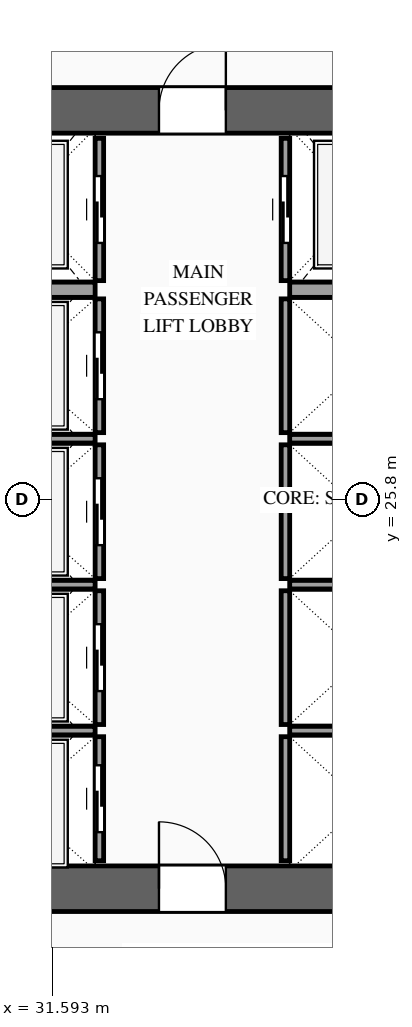
"""IFC4 building model, lengths in metres.
Left out: names, types, materials, properties, quantities, classifications, styles, units other than length and angle.
Written with IfcOpenShell. Run it as: python <this file> out.ifc"""

import sys

from ifc_helpers import new_model, si_unit, direction, frame, frame_2d, origin, place, context, subcontext, project, spatial, rectangle, extrude, source, transform, mapped, element, fill, save


model = new_model("IFC4")
c1 = context("Model", 3, precision=1e-05, world=origin(), true_north=direction((0.0, 1.0)))
c2 = subcontext(c1, "Body", "Model", "MODEL_VIEW")
j1 = project(units=[si_unit("LENGTHUNIT", "METRE"), si_unit("PLANEANGLEUNIT", "RADIAN")], contexts=[c1])
p1 = place(None, origin())
s1 = spatial("IfcSite", under=j1, at=p1, CompositionType="ELEMENT")
p2 = place(p1, origin())
s2 = spatial("IfcBuilding", under=s1, at=p2, CompositionType="ELEMENT")
p3 = place(p2, frame((0.0, 0.0, 101.0)))
s3 = spatial("IfcBuildingStorey", under=s2, at=p3, CompositionType="ELEMENT", Elevation=101.0)
p4 = place(p3, frame((23.425, 19.4, 0.0), z_axis=(0.0, 0.0, 1.0), x_axis=(1.0, 0.0, 0.0)))
e1 = element("IfcWall", 1, at=p4, inside=s3, PredefinedType="SHEAR", context=c2, shape_type="SweptSolid", body=[
    extrude(rectangle(XDim=27.15, YDim=0.75, at=frame_2d((13.575, 0.0))), origin(), (0.0, 0.0, 1.0), 3.6),
])
p5 = place(p4, frame((2.025, 0.0, 0.0)))
e2 = element("IfcOpeningElement", 2, at=p5, cuts=e1, PredefinedType="OPENING", context=c2, shape_type="SweptSolid", body=[
    extrude(rectangle(XDim=1.1, YDim=2.2, at=frame_2d((0.55, 1.1))), frame((0.0, 0.39, 0.0), z_axis=(0.0, -1.0, 0.0), x_axis=(1.0, 0.0, 0.0)), (0.0, 0.0, 1.0), 0.78),
])
p6 = place(p4, frame((9.925, 0.0, 0.0)))
e3 = element("IfcOpeningElement", 3, at=p6, cuts=e1, PredefinedType="OPENING", context=c2, shape_type="SweptSolid", body=[
    extrude(rectangle(XDim=1.1, YDim=2.2, at=frame_2d((0.55, 1.1))), frame((0.0, 0.39, 0.0), z_axis=(0.0, -1.0, 0.0), x_axis=(1.0, 0.0, 0.0)), (0.0, 0.0, 1.0), 0.78),
])
p7 = place(p4, frame((23.125, 0.0, 0.0)))
e4 = element("IfcOpeningElement", 4, at=p7, cuts=e1, PredefinedType="OPENING", context=c2, shape_type="SweptSolid", body=[
    extrude(rectangle(XDim=1.1, YDim=2.2, at=frame_2d((0.55, 1.1))), frame((0.0, 0.39, 0.0), z_axis=(0.0, -1.0, 0.0), x_axis=(1.0, 0.0, 0.0)), (0.0, 0.0, 1.0), 0.78),
])
p8 = place(p4, frame((19.745, 0.0, 0.0)))
e5 = element("IfcOpeningElement", 5, at=p8, cuts=e1, PredefinedType="OPENING", context=c2, shape_type="SweptSolid", body=[
    extrude(rectangle(XDim=0.9, YDim=2.15, at=frame_2d((0.45, 1.075))), frame((0.0, 0.39, 0.0), z_axis=(0.0, -1.0, 0.0), x_axis=(1.0, 0.0, 0.0)), (0.0, 0.0, 1.0), 0.78),
])
p9 = place(p4, frame((18.305, 0.0, 0.0)))
e6 = element("IfcOpeningElement", 6, at=p9, cuts=e1, PredefinedType="OPENING", context=c2, shape_type="SweptSolid", body=[
    extrude(rectangle(XDim=0.9, YDim=2.15, at=frame_2d((0.45, 1.075))), frame((0.0, 0.39, 0.0), z_axis=(0.0, -1.0, 0.0), x_axis=(1.0, 0.0, 0.0)), (0.0, 0.0, 1.0), 0.78),
])
p10 = place(p3, frame((23.425, 32.2, 0.0), z_axis=(0.0, 0.0, 1.0), x_axis=(1.0, 0.0, 0.0)))
e7 = element("IfcWall", 7, at=p10, inside=s3, PredefinedType="SHEAR", context=c2, shape_type="SweptSolid", body=[
    extrude(rectangle(XDim=27.15, YDim=0.75, at=frame_2d((13.575, 0.0))), origin(), (0.0, 0.0, 1.0), 3.6),
])
p11 = place(p10, frame((4.645, 0.0, 0.0)))
e8 = element("IfcOpeningElement", 8, at=p11, cuts=e7, PredefinedType="OPENING", context=c2, shape_type="SweptSolid", body=[
    extrude(rectangle(XDim=0.9, YDim=2.15, at=frame_2d((0.45, 1.075))), frame((0.0, 0.39, 0.0), z_axis=(0.0, -1.0, 0.0), x_axis=(1.0, 0.0, 0.0)), (0.0, 0.0, 1.0), 0.78),
])
p12 = place(p10, frame((9.925, 0.0, 0.0)))
e9 = element("IfcOpeningElement", 9, at=p12, cuts=e7, PredefinedType="OPENING", context=c2, shape_type="SweptSolid", body=[
    extrude(rectangle(XDim=1.1, YDim=2.2, at=frame_2d((0.55, 1.1))), frame((0.0, 0.39, 0.0), z_axis=(0.0, -1.0, 0.0), x_axis=(1.0, 0.0, 0.0)), (0.0, 0.0, 1.0), 0.78),
])
p13 = place(p10, frame((15.775, 0.0, 0.0)))
e10 = element("IfcOpeningElement", 10, at=p13, cuts=e7, PredefinedType="OPENING", context=c2, shape_type="SweptSolid", body=[
    extrude(rectangle(XDim=1.1, YDim=2.2, at=frame_2d((0.55, 1.1))), frame((0.0, 0.39, 0.0), z_axis=(0.0, -1.0, 0.0), x_axis=(1.0, 0.0, 0.0)), (0.0, 0.0, 1.0), 0.78),
])
p14 = place(p10, frame((19.745, 0.0, 0.0)))
e11 = element("IfcOpeningElement", 11, at=p14, cuts=e7, PredefinedType="OPENING", context=c2, shape_type="SweptSolid", body=[
    extrude(rectangle(XDim=0.9, YDim=2.15, at=frame_2d((0.45, 1.075))), frame((0.0, 0.39, 0.0), z_axis=(0.0, -1.0, 0.0), x_axis=(1.0, 0.0, 0.0)), (0.0, 0.0, 1.0), 0.78),
])
p15 = place(p3, frame((32.37, 19.86, 0.0), z_axis=(0.0, 0.0, 1.0), x_axis=(0.0, 1.0, 0.0)))
e12 = element("IfcWall", 12, at=p15, inside=s3, PredefinedType="SOLIDWALL", context=c2, shape_type="SweptSolid", body=[
    extrude(rectangle(XDim=2.04, YDim=0.14, at=frame_2d((1.02, 0.0))), origin(), (0.0, 0.0, 1.0), 3.38),
])
p16 = place(p15, frame((0.47, 0.0, 0.0)))
e13 = element("IfcOpeningElement", 13, at=p16, cuts=e12, PredefinedType="OPENING", context=c2, shape_type="SweptSolid", body=[
    extrude(rectangle(XDim=1.1, YDim=2.2, at=frame_2d((0.55, 1.1))), frame((0.0, 0.085, 0.0), z_axis=(0.0, -1.0, 0.0), x_axis=(1.0, 0.0, 0.0)), (0.0, 0.0, 1.0), 0.17),
])
m1 = source(origin(), c2, "Body", "SweptSolid", [
    extrude(rectangle(XDim=2.5, YDim=0.14, at=frame_2d((1.25, 0.0))), origin(), (0.0, 0.0, 1.0), 3.38),
])
p17 = place(p3, frame((29.8, 22.0, 0.0), z_axis=(0.0, 0.0, 1.0), x_axis=(1.0, 0.0, 0.0)))
e14 = element("IfcWall", 14, at=p17, inside=s3, PredefinedType="SOLIDWALL", context=c2, shape_type="MappedRepresentation", body=[
    mapped(m1, transform((0.0, 0.0, 0.0), scale=1.0)),
])
p18 = place(p3, frame((32.37, 22.1, 0.0), z_axis=(0.0, 0.0, 1.0), x_axis=(0.0, 1.0, 0.0)))
e15 = element("IfcWall", 15, at=p18, inside=s3, PredefinedType="SOLIDWALL", context=c2, shape_type="SweptSolid", body=[
    extrude(rectangle(XDim=2.2, YDim=0.14, at=frame_2d((1.1, 0.0))), origin(), (0.0, 0.0, 1.0), 3.38),
])
p19 = place(p18, frame((0.55, 0.0, 0.0)))
e16 = element("IfcOpeningElement", 16, at=p19, cuts=e15, PredefinedType="OPENING", context=c2, shape_type="SweptSolid", body=[
    extrude(rectangle(XDim=1.1, YDim=2.2, at=frame_2d((0.55, 1.1))), frame((0.0, 0.085, 0.0), z_axis=(0.0, -1.0, 0.0), x_axis=(1.0, 0.0, 0.0)), (0.0, 0.0, 1.0), 0.17),
])
p20 = place(p3, frame((29.8, 24.4, 0.0), z_axis=(0.0, 0.0, 1.0), x_axis=(1.0, 0.0, 0.0)))
e17 = element("IfcWall", 17, at=p20, inside=s3, PredefinedType="SOLIDWALL", context=c2, shape_type="MappedRepresentation", body=[
    mapped(m1, transform((0.0, 0.0, 0.0), scale=1.0)),
])
p21 = place(p3, frame((32.37, 24.5, 0.0), z_axis=(0.0, 0.0, 1.0), x_axis=(0.0, 1.0, 0.0)))
e18 = element("IfcWall", 18, at=p21, inside=s3, PredefinedType="SOLIDWALL", context=c2, shape_type="SweptSolid", body=[
    extrude(rectangle(XDim=2.2, YDim=0.14, at=frame_2d((1.1, 0.0))), origin(), (0.0, 0.0, 1.0), 3.38),
])
p22 = place(p21, frame((0.55, 0.0, 0.0)))
e19 = element("IfcOpeningElement", 19, at=p22, cuts=e18, PredefinedType="OPENING", context=c2, shape_type="SweptSolid", body=[
    extrude(rectangle(XDim=1.1, YDim=2.2, at=frame_2d((0.55, 1.1))), frame((0.0, 0.085, 0.0), z_axis=(0.0, -1.0, 0.0), x_axis=(1.0, 0.0, 0.0)), (0.0, 0.0, 1.0), 0.17),
])
p23 = place(p3, frame((29.8, 26.8, 0.0), z_axis=(0.0, 0.0, 1.0), x_axis=(1.0, 0.0, 0.0)))
e20 = element("IfcWall", 20, at=p23, inside=s3, PredefinedType="SOLIDWALL", context=c2, shape_type="MappedRepresentation", body=[
    mapped(m1, transform((0.0, 0.0, 0.0), scale=1.0)),
])
p24 = place(p3, frame((32.37, 26.9, 0.0), z_axis=(0.0, 0.0, 1.0), x_axis=(0.0, 1.0, 0.0)))
e21 = element("IfcWall", 21, at=p24, inside=s3, PredefinedType="SOLIDWALL", context=c2, shape_type="SweptSolid", body=[
    extrude(rectangle(XDim=2.2, YDim=0.14, at=frame_2d((1.1, 0.0))), origin(), (0.0, 0.0, 1.0), 3.38),
])
p25 = place(p24, frame((0.55, 0.0, 0.0)))
e22 = element("IfcOpeningElement", 22, at=p25, cuts=e21, PredefinedType="OPENING", context=c2, shape_type="SweptSolid", body=[
    extrude(rectangle(XDim=1.1, YDim=2.2, at=frame_2d((0.55, 1.1))), frame((0.0, 0.085, 0.0), z_axis=(0.0, -1.0, 0.0), x_axis=(1.0, 0.0, 0.0)), (0.0, 0.0, 1.0), 0.17),
])
p26 = place(p3, frame((32.37, 29.4, 0.0), z_axis=(0.0, 0.0, 1.0), x_axis=(0.0, 1.0, 0.0)))
e23 = element("IfcWall", 23, at=p26, inside=s3, PredefinedType="SOLIDWALL", context=c2, shape_type="SweptSolid", body=[
    extrude(rectangle(XDim=2.34, YDim=0.14, at=frame_2d((1.17, 0.0))), origin(), (0.0, 0.0, 1.0), 3.38),
])
p27 = place(p26, frame((0.62, 0.0, 0.0)))
e24 = element("IfcOpeningElement", 24, at=p27, cuts=e23, PredefinedType="OPENING", context=c2, shape_type="SweptSolid", body=[
    extrude(rectangle(XDim=1.1, YDim=2.2, at=frame_2d((0.55, 1.1))), frame((0.0, 0.085, 0.0), z_axis=(0.0, -1.0, 0.0), x_axis=(1.0, 0.0, 0.0)), (0.0, 0.0, 1.0), 0.17),
])
m2 = source(origin(), c2, "Body", "SweptSolid", [
    extrude(rectangle(XDim=2.5, YDim=0.25, at=frame_2d((1.25, 0.0))), origin(), (0.0, 0.0, 1.0), 3.38),
])
p28 = place(p3, frame((29.8, 29.25, 0.0), z_axis=(0.0, 0.0, 1.0), x_axis=(1.0, 0.0, 0.0)))
e25 = element("IfcWall", 25, at=p28, inside=s3, PredefinedType="SOLIDWALL", context=c2, shape_type="MappedRepresentation", body=[
    mapped(m2, transform((0.0, 0.0, 0.0), scale=1.0)),
])
m3 = source(origin(), c2, "Body", "SweptSolid", [
    extrude(rectangle(XDim=2.04, YDim=0.14, at=frame_2d((1.02, 0.0))), origin(), (0.0, 0.0, 1.0), 3.38),
])
p29 = place(p3, frame((35.43, 19.86, 0.0), z_axis=(0.0, 0.0, 1.0), x_axis=(0.0, 1.0, 0.0)))
e26 = element("IfcWall", 26, at=p29, inside=s3, PredefinedType="SOLIDWALL", context=c2, shape_type="MappedRepresentation", body=[
    mapped(m3, transform((0.0, 0.0, 0.0), scale=1.0)),
])
m4 = source(origin(), c2, "Body", "SweptSolid", [
    extrude(rectangle(XDim=2.4, YDim=0.14, at=frame_2d((1.2, 0.0))), origin(), (0.0, 0.0, 1.0), 3.38),
])
p30 = place(p3, frame((35.5, 22.0, 0.0), z_axis=(0.0, 0.0, 1.0), x_axis=(1.0, 0.0, 0.0)))
e27 = element("IfcWall", 27, at=p30, inside=s3, PredefinedType="SOLIDWALL", context=c2, shape_type="MappedRepresentation", body=[
    mapped(m4, transform((0.0, 0.0, 0.0), scale=1.0)),
])
m5 = source(origin(), c2, "Body", "SweptSolid", [
    extrude(rectangle(XDim=2.2, YDim=0.14, at=frame_2d((1.1, 0.0))), origin(), (0.0, 0.0, 1.0), 3.38),
])
p31 = place(p3, frame((35.43, 22.1, 0.0), z_axis=(0.0, 0.0, 1.0), x_axis=(0.0, 1.0, 0.0)))
e28 = element("IfcWall", 28, at=p31, inside=s3, PredefinedType="SOLIDWALL", context=c2, shape_type="MappedRepresentation", body=[
    mapped(m5, transform((0.0, 0.0, 0.0), scale=1.0)),
])
p32 = place(p3, frame((35.5, 24.4, 0.0), z_axis=(0.0, 0.0, 1.0), x_axis=(1.0, 0.0, 0.0)))
e29 = element("IfcWall", 29, at=p32, inside=s3, PredefinedType="SOLIDWALL", context=c2, shape_type="MappedRepresentation", body=[
    mapped(m4, transform((0.0, 0.0, 0.0), scale=1.0)),
])
p33 = place(p3, frame((35.43, 24.5, 0.0), z_axis=(0.0, 0.0, 1.0), x_axis=(0.0, 1.0, 0.0)))
e30 = element("IfcWall", 30, at=p33, inside=s3, PredefinedType="SOLIDWALL", context=c2, shape_type="MappedRepresentation", body=[
    mapped(m5, transform((0.0, 0.0, 0.0), scale=1.0)),
])
p34 = place(p3, frame((35.5, 26.8, 0.0), z_axis=(0.0, 0.0, 1.0), x_axis=(1.0, 0.0, 0.0)))
e31 = element("IfcWall", 31, at=p34, inside=s3, PredefinedType="SOLIDWALL", context=c2, shape_type="MappedRepresentation", body=[
    mapped(m4, transform((0.0, 0.0, 0.0), scale=1.0)),
])
m6 = source(origin(), c2, "Body", "SweptSolid", [
    extrude(rectangle(XDim=2.2, YDim=0.14, at=frame_2d((1.1, 0.0))), origin(), (0.0, 0.0, 1.0), 3.38),
])
p35 = place(p3, frame((35.43, 26.9, 0.0), z_axis=(0.0, 0.0, 1.0), x_axis=(0.0, 1.0, 0.0)))
e32 = element("IfcWall", 32, at=p35, inside=s3, PredefinedType="SOLIDWALL", context=c2, shape_type="MappedRepresentation", body=[
    mapped(m6, transform((0.0, 0.0, 0.0), scale=1.0)),
])
p36 = place(p3, frame((35.43, 29.4, 0.0), z_axis=(0.0, 0.0, 1.0), x_axis=(0.0, 1.0, 0.0)))
e33 = element("IfcWall", 33, at=p36, inside=s3, PredefinedType="SOLIDWALL", context=c2, shape_type="SweptSolid", body=[
    extrude(rectangle(XDim=2.34, YDim=0.14, at=frame_2d((1.17, 0.0))), origin(), (0.0, 0.0, 1.0), 3.38),
])
p37 = place(p36, frame((0.62, 0.0, 0.0)))
e34 = element("IfcOpeningElement", 34, at=p37, cuts=e33, PredefinedType="OPENING", context=c2, shape_type="SweptSolid", body=[
    extrude(rectangle(XDim=1.1, YDim=2.2, at=frame_2d((0.55, 1.1))), frame((0.0, 0.085, 0.0), z_axis=(0.0, -1.0, 0.0), x_axis=(1.0, 0.0, 0.0)), (0.0, 0.0, 1.0), 0.17),
])
m7 = source(origin(), c2, "Body", "SweptSolid", [
    extrude(rectangle(XDim=2.4, YDim=0.25, at=frame_2d((1.2, 0.0))), origin(), (0.0, 0.0, 1.0), 3.38),
])
p38 = place(p3, frame((35.5, 29.25, 0.0), z_axis=(0.0, 0.0, 1.0), x_axis=(1.0, 0.0, 0.0)))
e35 = element("IfcWall", 35, at=p38, inside=s3, PredefinedType="SOLIDWALL", context=c2, shape_type="MappedRepresentation", body=[
    mapped(m7, transform((0.0, 0.0, 0.0), scale=1.0)),
])
m8 = source(origin(), c2, "Body", "SweptSolid", [
    extrude(rectangle(XDim=1.1, YDim=2.2, at=frame_2d((0.55, 1.1))), frame((0.0, 0.025, 0.0), z_axis=(0.0, -1.0, 0.0), x_axis=(1.0, 0.0, 0.0)), (0.0, 0.0, 1.0), 0.05),
])
p39 = place(p16, origin())
e36 = element("IfcDoor", 36, at=p39, inside=s3, OperationType="SLIDING_TO_LEFT", PredefinedType="DOOR", context=c2, shape_type="MappedRepresentation", body=[
    mapped(m8, transform((0.0, 0.0, 0.0), scale=1.0)),
])
fill(e13, e36)
p40 = place(p19, origin())
e37 = element("IfcDoor", 37, at=p40, inside=s3, OperationType="SLIDING_TO_RIGHT", PredefinedType="DOOR", context=c2, shape_type="MappedRepresentation", body=[
    mapped(m8, transform((0.0, 0.0, 0.0), scale=1.0)),
])
fill(e16, e37)
p41 = place(p22, origin())
e38 = element("IfcDoor", 38, at=p41, inside=s3, OperationType="SLIDING_TO_LEFT", PredefinedType="DOOR", context=c2, shape_type="MappedRepresentation", body=[
    mapped(m8, transform((0.0, 0.0, 0.0), scale=1.0)),
])
fill(e19, e38)
p42 = place(p25, origin())
e39 = element("IfcDoor", 39, at=p42, inside=s3, OperationType="SLIDING_TO_RIGHT", PredefinedType="DOOR", context=c2, shape_type="MappedRepresentation", body=[
    mapped(m8, transform((0.0, 0.0, 0.0), scale=1.0)),
])
fill(e22, e39)
p43 = place(p27, origin())
e40 = element("IfcDoor", 40, at=p43, inside=s3, OperationType="SLIDING_TO_LEFT", PredefinedType="DOOR", context=c2, shape_type="MappedRepresentation", body=[
    mapped(m8, transform((0.0, 0.0, 0.0), scale=1.0)),
])
fill(e24, e40)
p44 = place(p37, origin())
e41 = element("IfcDoor", 41, at=p44, inside=s3, OperationType="SLIDING_TO_RIGHT", PredefinedType="DOOR", context=c2, shape_type="MappedRepresentation", body=[
    mapped(m8, transform((0.0, 0.0, 0.0), scale=1.0)),
])
fill(e34, e41)
m9 = source(origin(), c2, "Body", "SweptSolid", [
    extrude(rectangle(XDim=1.1, YDim=2.2, at=frame_2d((0.55, 1.1))), frame((0.0, 0.025, 0.0), z_axis=(0.0, -1.0, 0.0), x_axis=(1.0, 0.0, 0.0)), (0.0, 0.0, 1.0), 0.05),
])
p45 = place(p6, origin())
e42 = element("IfcDoor", 42, at=p45, inside=s3, OperationType="SINGLE_SWING_LEFT", PredefinedType="DOOR", context=c2, shape_type="MappedRepresentation", body=[
    mapped(m9, transform((0.0, 0.0, 0.0), scale=1.0)),
])
fill(e3, e42)
p46 = place(p12, origin())
e43 = element("IfcDoor", 43, at=p46, inside=s3, OperationType="SINGLE_SWING_RIGHT", PredefinedType="DOOR", context=c2, shape_type="MappedRepresentation", body=[
    mapped(m9, transform((0.0, 0.0, 0.0), scale=1.0)),
])
fill(e9, e43)
save(model, sys.argv[1])
